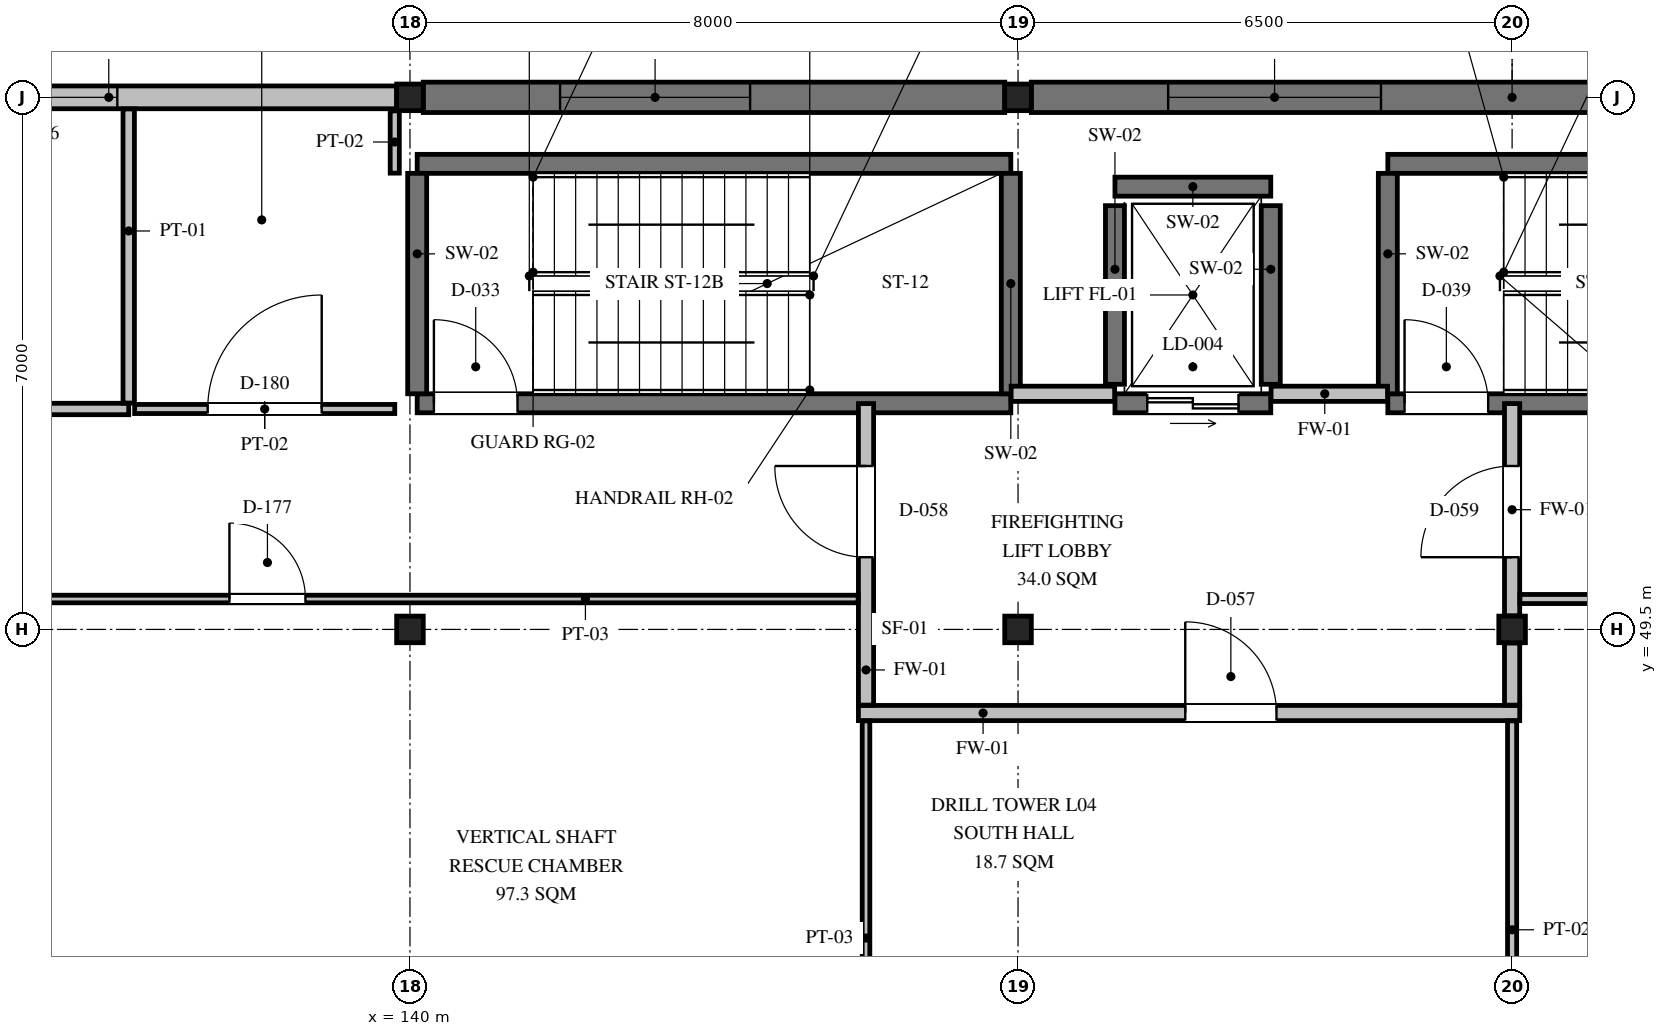
"""IFC4 building model, lengths in metres.
Left out: names, types, materials, properties, quantities, classifications, styles, units other than length and angle.
Written with IfcOpenShell. Run it as: python <this file> out.ifc"""

import sys

from ifc_helpers import new_model, si_unit, direction, frame, frame_2d, origin, origin_2d, place, context, subcontext, project, spatial, rectangle, i_section, extrude, element, fill, save


model = new_model("IFC4")
c1 = context("Model", 3, precision=1e-05, world=origin(), true_north=direction((0.0, 1.0)))
c2 = subcontext(c1, "Body", "Model", "MODEL_VIEW")
j1 = project(units=[si_unit("LENGTHUNIT", "METRE"), si_unit("PLANEANGLEUNIT", "RADIAN")], contexts=[c1])
p1 = place(None, origin())
s1 = spatial("IfcSite", under=j1, at=p1, CompositionType="ELEMENT")
p2 = place(p1, origin())
s2 = spatial("IfcBuilding", under=s1, at=p2, CompositionType="ELEMENT")
p3 = place(p2, frame((0.0, 0.0, 14.25)))
s3 = spatial("IfcBuildingStorey", under=s2, at=p3, CompositionType="ELEMENT", Elevation=14.25)
for number, where, z_axis, x_axis in (
    (1, (140.0, 49.5, 0.0), (0.0, 0.0, 1.0), (1.0, 0.0, 0.0)),
    (2, (140.0, 56.5, 0.0), (0.0, 0.0, 1.0), (1.0, 0.0, 0.0)),
    (3, (148.0, 49.5, 0.0), (0.0, 0.0, 1.0), (1.0, 0.0, 0.0)),
    (4, (148.0, 56.5, 0.0), (0.0, 0.0, 1.0), (1.0, 0.0, 0.0)),
    (5, (154.5, 49.5, 0.0), (0.0, 0.0, 1.0), (1.0, 0.0, 0.0)),
):
    element("IfcColumn", number, at=place(p3, frame(where, z_axis=z_axis, x_axis=x_axis)), inside=s3, PredefinedType="COLUMN", context=c2, shape_type="SweptSolid", body=[
        extrude(i_section(OverallWidth=0.35, OverallDepth=0.35, WebThickness=0.012, FlangeThickness=0.019, FilletRadius=0.02, at=origin_2d()), origin(), (0.0, 0.0, 1.0), 4.2),
    ])
p4 = place(p3, frame((132.25, 56.5, 0.0), z_axis=(0.0, 0.0, 1.0), x_axis=(1.0, 0.0, 0.0)))
e6 = element("IfcWall", 6, at=p4, inside=s3, PredefinedType="SOLIDWALL", context=c2, shape_type="SweptSolid", body=[
    extrude(rectangle(XDim=7.575, YDim=0.3, at=frame_2d((3.788, 0.0))), origin(), (0.0, 0.0, 1.0), 3.444),
])
p5 = place(p4, frame((1.8, 0.0, 0.9)))
e7 = element("IfcOpeningElement", 7, at=p5, cuts=e6, PredefinedType="OPENING", context=c2, shape_type="SweptSolid", body=[
    extrude(rectangle(XDim=2.1, YDim=2.1, at=frame_2d((1.05, 1.05))), frame((0.0, 0.16, 0.0), z_axis=(0.0, -1.0, 0.0), x_axis=(1.0, 0.0, 0.0)), (0.0, 0.0, 1.0), 0.32),
])
p6 = place(p3, frame((140.175, 56.5, 0.0), z_axis=(0.0, 0.0, 1.0), x_axis=(1.0, 0.0, 0.0)))
e8 = element("IfcWall", 8, at=p6, inside=s3, PredefinedType="SHEAR", context=c2, shape_type="SweptSolid", body=[
    extrude(rectangle(XDim=7.65, YDim=0.4, at=frame_2d((3.825, 0.0))), origin(), (0.0, 0.0, 1.0), 4.0),
])
p7 = place(p6, frame((1.8, 0.0, 0.9)))
e9 = element("IfcOpeningElement", 9, at=p7, cuts=e8, PredefinedType="OPENING", context=c2, shape_type="SweptSolid", body=[
    extrude(rectangle(XDim=2.5, YDim=2.1, at=frame_2d((1.25, 1.05))), frame((0.0, 0.21, 0.0), z_axis=(0.0, -1.0, 0.0), x_axis=(1.0, 0.0, 0.0)), (0.0, 0.0, 1.0), 0.42),
])
p8 = place(p3, frame((148.175, 56.5, 0.0), z_axis=(0.0, 0.0, 1.0), x_axis=(1.0, 0.0, 0.0)))
e10 = element("IfcWall", 10, at=p8, inside=s3, PredefinedType="SHEAR", context=c2, shape_type="SweptSolid", body=[
    extrude(rectangle(XDim=12.65, YDim=0.4, at=frame_2d((6.325, 0.0))), origin(), (0.0, 0.0, 1.0), 4.0),
])
p9 = place(p8, frame((1.8, 0.0, 0.9)))
e11 = element("IfcOpeningElement", 11, at=p9, cuts=e10, PredefinedType="OPENING", context=c2, shape_type="SweptSolid", body=[
    extrude(rectangle(XDim=2.8, YDim=1.2, at=frame_2d((1.4, 0.6))), frame((0.0, 0.21, 0.0), z_axis=(0.0, -1.0, 0.0), x_axis=(1.0, 0.0, 0.0)), (0.0, 0.0, 1.0), 0.42),
])
p10 = place(p3, frame((140.095, 52.475, 0.0), z_axis=(0.0, 0.0, 1.0), x_axis=(1.0, 0.0, 0.0)))
e12 = element("IfcWall", 12, at=p10, inside=s3, PredefinedType="SHEAR", context=c2, shape_type="SweptSolid", body=[
    extrude(rectangle(XDim=7.81, YDim=0.25, at=frame_2d((3.905, 0.0))), origin(), (0.0, 0.0, 1.0), 4.0),
])
p11 = place(p10, frame((0.22, 0.0, 0.0)))
e13 = element("IfcOpeningElement", 13, at=p11, cuts=e12, PredefinedType="OPENING", context=c2, shape_type="SweptSolid", body=[
    extrude(rectangle(XDim=1.1, YDim=2.15, at=frame_2d((0.55, 1.075))), frame((0.0, 0.135, 0.0), z_axis=(0.0, -1.0, 0.0), x_axis=(1.0, 0.0, 0.0)), (0.0, 0.0, 1.0), 0.27),
])
p12 = place(p3, frame((140.095, 55.625, 0.0), z_axis=(0.0, 0.0, 1.0), x_axis=(1.0, 0.0, 0.0)))
e14 = element("IfcWall", 14, at=p12, inside=s3, PredefinedType="SHEAR", context=c2, shape_type="SweptSolid", body=[
    extrude(rectangle(XDim=7.81, YDim=0.25, at=frame_2d((3.905, 0.0))), origin(), (0.0, 0.0, 1.0), 4.0),
])
for number, where, z_axis, x_axis in (
    (15, (140.095, 52.6, 0.0), (0.0, 0.0, 1.0), (0.0, 1.0, 0.0)),
    (16, (147.905, 52.6, 0.0), (0.0, 0.0, 1.0), (0.0, 1.0, 0.0)),
):
    element("IfcWall", number, at=place(p3, frame(where, z_axis=z_axis, x_axis=x_axis)), inside=s3, PredefinedType="SHEAR", context=c2, shape_type="SweptSolid", body=[
        extrude(rectangle(XDim=2.9, YDim=0.25, at=frame_2d((1.45, 0.0))), origin(), (0.0, 0.0, 1.0), 4.0),
    ])
p13 = place(p3, frame((152.865, 52.475, 0.0), z_axis=(0.0, 0.0, 1.0), x_axis=(1.0, 0.0, 0.0)))
e17 = element("IfcWall", 17, at=p13, inside=s3, PredefinedType="SHEAR", context=c2, shape_type="SweptSolid", body=[
    extrude(rectangle(XDim=7.935, YDim=0.25, at=frame_2d((3.968, 0.0))), origin(), (0.0, 0.0, 1.0), 4.0),
])
p14 = place(p13, frame((0.22, 0.0, 0.0)))
e18 = element("IfcOpeningElement", 18, at=p14, cuts=e17, PredefinedType="OPENING", context=c2, shape_type="SweptSolid", body=[
    extrude(rectangle(XDim=1.1, YDim=2.15, at=frame_2d((0.55, 1.075))), frame((0.0, 0.135, 0.0), z_axis=(0.0, -1.0, 0.0), x_axis=(1.0, 0.0, 0.0)), (0.0, 0.0, 1.0), 0.27),
])
p15 = place(p3, frame((152.865, 55.625, 0.0), z_axis=(0.0, 0.0, 1.0), x_axis=(1.0, 0.0, 0.0)))
e19 = element("IfcWall", 19, at=p15, inside=s3, PredefinedType="SHEAR", context=c2, shape_type="SweptSolid", body=[
    extrude(rectangle(XDim=7.935, YDim=0.25, at=frame_2d((3.968, 0.0))), origin(), (0.0, 0.0, 1.0), 4.0),
])
p16 = place(p3, frame((152.865, 52.6, 0.0), z_axis=(0.0, 0.0, 1.0), x_axis=(0.0, 1.0, 0.0)))
e20 = element("IfcWall", 20, at=p16, inside=s3, PredefinedType="SHEAR", context=c2, shape_type="SweptSolid", body=[
    extrude(rectangle(XDim=2.9, YDim=0.25, at=frame_2d((1.45, 0.0))), origin(), (0.0, 0.0, 1.0), 4.0),
])
p17 = place(p3, frame((149.275, 52.475, 0.0), z_axis=(0.0, 0.0, 1.0), x_axis=(1.0, 0.0, 0.0)))
e21 = element("IfcWall", 21, at=p17, inside=s3, PredefinedType="SHEAR", context=c2, shape_type="SweptSolid", body=[
    extrude(rectangle(XDim=2.05, YDim=0.25, at=frame_2d((1.025, 0.0))), origin(), (0.0, 0.0, 1.0), 4.0),
])
p18 = place(p17, frame((0.425, 0.0, 0.0)))
e22 = element("IfcOpeningElement", 22, at=p18, cuts=e21, PredefinedType="OPENING", context=c2, shape_type="SweptSolid", body=[
    extrude(rectangle(XDim=1.2, YDim=2.15, at=frame_2d((0.6, 1.075))), frame((0.0, 0.135, 0.0), z_axis=(0.0, -1.0, 0.0), x_axis=(1.0, 0.0, 0.0)), (0.0, 0.0, 1.0), 0.27),
])
p19 = place(p3, frame((149.275, 55.325, 0.0), z_axis=(0.0, 0.0, 1.0), x_axis=(1.0, 0.0, 0.0)))
e23 = element("IfcWall", 23, at=p19, inside=s3, PredefinedType="SHEAR", context=c2, shape_type="SweptSolid", body=[
    extrude(rectangle(XDim=2.05, YDim=0.25, at=frame_2d((1.025, 0.0))), origin(), (0.0, 0.0, 1.0), 4.0),
])
for number, where, z_axis, x_axis in (
    (24, (149.275, 52.725, 0.0), (0.0, 0.0, 1.0), (0.0, 1.0, 0.0)),
    (25, (151.325, 52.725, 0.0), (0.0, 0.0, 1.0), (0.0, 1.0, 0.0)),
):
    element("IfcWall", number, at=place(p3, frame(where, z_axis=z_axis, x_axis=x_axis)), inside=s3, PredefinedType="SHEAR", context=c2, shape_type="SweptSolid", body=[
        extrude(rectangle(XDim=2.35, YDim=0.25, at=frame_2d((1.175, 0.0))), origin(), (0.0, 0.0, 1.0), 4.0),
    ])
p20 = place(p3, frame((147.909, 52.6, 0.0), z_axis=(0.0, 0.0, 1.0), x_axis=(1.0, 0.0, 0.0)))
e26 = element("IfcWall", 26, at=p20, inside=s3, PredefinedType="PARTITIONING", context=c2, shape_type="SweptSolid", body=[
    extrude(rectangle(XDim=1.362, YDim=0.2, at=frame_2d((0.681, 0.0))), origin(), (0.0, 0.0, 1.0), 4.0),
])
p21 = place(p3, frame((151.329, 52.6, 0.0), z_axis=(0.0, 0.0, 1.0), x_axis=(1.0, 0.0, 0.0)))
e27 = element("IfcWall", 27, at=p21, inside=s3, PredefinedType="PARTITIONING", context=c2, shape_type="SweptSolid", body=[
    extrude(rectangle(XDim=1.532, YDim=0.2, at=frame_2d((0.766, 0.0))), origin(), (0.0, 0.0, 1.0), 4.0),
])
p22 = place(p3, frame((145.9, 48.4, 0.0), z_axis=(0.0, 0.0, 1.0), x_axis=(1.0, 0.0, 0.0)))
e28 = element("IfcWall", 28, at=p22, inside=s3, PredefinedType="PARTITIONING", context=c2, shape_type="SweptSolid", body=[
    extrude(rectangle(XDim=8.7, YDim=0.2, at=frame_2d((4.35, 0.0))), origin(), (0.0, 0.0, 1.0), 4.0),
])
p23 = place(p22, frame((4.3, 0.0, 0.0)))
e29 = element("IfcOpeningElement", 29, at=p23, cuts=e28, PredefinedType="OPENING", context=c2, shape_type="SweptSolid", body=[
    extrude(rectangle(XDim=1.2, YDim=2.15, at=frame_2d((0.6, 1.075))), frame((0.0, 0.11, 0.0), z_axis=(0.0, -1.0, 0.0), x_axis=(1.0, 0.0, 0.0)), (0.0, 0.0, 1.0), 0.22),
])
p24 = place(p3, frame((146.0, 48.504, 0.0), z_axis=(0.0, 0.0, 1.0), x_axis=(0.0, 1.0, 0.0)))
e30 = element("IfcWall", 30, at=p24, inside=s3, PredefinedType="PARTITIONING", context=c2, shape_type="SweptSolid", body=[
    extrude(rectangle(XDim=3.967, YDim=0.2, at=frame_2d((1.983, 0.0))), origin(), (0.0, 0.0, 1.0), 4.0),
])
p25 = place(p24, frame((1.946, 0.0, 0.0)))
e31 = element("IfcOpeningElement", 31, at=p25, cuts=e30, PredefinedType="OPENING", context=c2, shape_type="SweptSolid", body=[
    extrude(rectangle(XDim=1.2, YDim=2.15, at=frame_2d((0.6, 1.075))), frame((0.0, 0.11, 0.0), z_axis=(0.0, -1.0, 0.0), x_axis=(1.0, 0.0, 0.0)), (0.0, 0.0, 1.0), 0.22),
])
p26 = place(p3, frame((154.5, 48.504, 0.0), z_axis=(0.0, 0.0, 1.0), x_axis=(0.0, 1.0, 0.0)))
e32 = element("IfcWall", 32, at=p26, inside=s3, PredefinedType="PARTITIONING", context=c2, shape_type="SweptSolid", body=[
    extrude(rectangle(XDim=0.817, YDim=0.2, at=frame_2d((0.409, 0.0))), origin(), (0.0, 0.0, 1.0), 3.494),
])
p27 = place(p3, frame((154.5, 49.679, 0.0), z_axis=(0.0, 0.0, 1.0), x_axis=(0.0, 1.0, 0.0)))
e33 = element("IfcWall", 33, at=p27, inside=s3, PredefinedType="PARTITIONING", context=c2, shape_type="SweptSolid", body=[
    extrude(rectangle(XDim=2.792, YDim=0.2, at=frame_2d((1.396, 0.0))), origin(), (0.0, 0.0, 1.0), 4.0),
])
p28 = place(p27, frame((0.771, 0.0, 0.0)))
e34 = element("IfcOpeningElement", 34, at=p28, cuts=e33, PredefinedType="OPENING", context=c2, shape_type="SweptSolid", body=[
    extrude(rectangle(XDim=1.2, YDim=2.15, at=frame_2d((0.6, 1.075))), frame((0.0, 0.11, 0.0), z_axis=(0.0, -1.0, 0.0), x_axis=(1.0, 0.0, 0.0)), (0.0, 0.0, 1.0), 0.22),
])
p29 = place(p3, frame((132.153, 49.9, 0.0), z_axis=(0.0, 0.0, 1.0), x_axis=(1.0, 0.0, 0.0)))
e35 = element("IfcWall", 35, at=p29, inside=s3, PredefinedType="PARTITIONING", context=c2, shape_type="SweptSolid", body=[
    extrude(rectangle(XDim=13.744, YDim=0.1, at=frame_2d((6.872, 0.0))), origin(), (0.0, 0.0, 1.0), 4.0),
])
p30 = place(p29, frame((5.472, 0.0, 0.0)))
e36 = element("IfcOpeningElement", 36, at=p30, cuts=e35, PredefinedType="OPENING", context=c2, shape_type="SweptSolid", body=[
    extrude(rectangle(XDim=1.0, YDim=2.1, at=frame_2d((0.5, 1.05))), frame((0.0, 0.06, 0.0), z_axis=(0.0, -1.0, 0.0), x_axis=(1.0, 0.0, 0.0)), (0.0, 0.0, 1.0), 0.12),
])
p31 = place(p3, frame((146.0, 42.583, 0.0), z_axis=(0.0, 0.0, 1.0), x_axis=(0.0, 1.0, 0.0)))
e37 = element("IfcWall", 37, at=p31, inside=s3, PredefinedType="PARTITIONING", context=c2, shape_type="SweptSolid", body=[
    extrude(rectangle(XDim=5.714, YDim=0.1, at=frame_2d((2.857, 0.0))), origin(), (0.0, 0.0, 1.0), 4.0),
])
p32 = place(p3, frame((154.603, 49.9, 0.0), z_axis=(0.0, 0.0, 1.0), x_axis=(1.0, 0.0, 0.0)))
e38 = element("IfcWall", 38, at=p32, inside=s3, PredefinedType="PARTITIONING", context=c2, shape_type="SweptSolid", body=[
    extrude(rectangle(XDim=6.194, YDim=0.12, at=frame_2d((3.097, 0.0))), origin(), (0.0, 0.0, 1.0), 4.0),
])
p33 = place(p32, frame((2.522, 0.0, 0.0)))
e39 = element("IfcOpeningElement", 39, at=p33, cuts=e38, PredefinedType="OPENING", context=c2, shape_type="SweptSolid", body=[
    extrude(rectangle(XDim=1.15, YDim=2.1, at=frame_2d((0.575, 1.05))), frame((0.0, 0.07, 0.0), z_axis=(0.0, -1.0, 0.0), x_axis=(1.0, 0.0, 0.0)), (0.0, 0.0, 1.0), 0.14),
])
p34 = place(p3, frame((154.5, 42.8, 0.0), z_axis=(0.0, 0.0, 1.0), x_axis=(0.0, 1.0, 0.0)))
e40 = element("IfcWall", 40, at=p34, inside=s3, PredefinedType="PARTITIONING", context=c2, shape_type="SweptSolid", body=[
    extrude(rectangle(XDim=5.497, YDim=0.12, at=frame_2d((2.749, 0.0))), origin(), (0.0, 0.0, 1.0), 3.494),
])
p35 = place(p3, frame((132.153, 52.4, 0.0), z_axis=(0.0, 0.0, 1.0), x_axis=(1.0, 0.0, 0.0)))
e41 = element("IfcWall", 41, at=p35, inside=s3, PredefinedType="PARTITIONING", context=c2, shape_type="SweptSolid", body=[
    extrude(rectangle(XDim=4.147, YDim=0.15, at=frame_2d((2.073, 0.0))), origin(), (0.0, 0.0, 1.0), 4.0),
])
p36 = place(p35, frame((1.614, 0.0, 0.0)))
e42 = element("IfcOpeningElement", 42, at=p36, cuts=e41, PredefinedType="OPENING", context=c2, shape_type="SweptSolid", body=[
    extrude(rectangle(XDim=0.92, YDim=2.1, at=frame_2d((0.46, 1.05))), frame((0.0, 0.085, 0.0), z_axis=(0.0, -1.0, 0.0), x_axis=(1.0, 0.0, 0.0)), (0.0, 0.0, 1.0), 0.17),
])
p37 = place(p3, frame((136.3, 52.478, 0.0), z_axis=(0.0, 0.0, 1.0), x_axis=(0.0, 1.0, 0.0)))
e43 = element("IfcWall", 43, at=p37, inside=s3, PredefinedType="PARTITIONING", context=c2, shape_type="SweptSolid", body=[
    extrude(rectangle(XDim=3.869, YDim=0.15, at=frame_2d((1.935, 0.0))), origin(), (0.0, 0.0, 1.0), 4.0),
])
p38 = place(p3, frame((136.378, 52.4, 0.0), z_axis=(0.0, 0.0, 1.0), x_axis=(1.0, 0.0, 0.0)))
e44 = element("IfcWall", 44, at=p38, inside=s3, PredefinedType="PARTITIONING", context=c2, shape_type="SweptSolid", body=[
    extrude(rectangle(XDim=3.422, YDim=0.12, at=frame_2d((1.711, 0.0))), origin(), (0.0, 0.0, 1.0), 4.0),
])
p39 = place(p38, frame((0.961, 0.0, 0.0)))
e45 = element("IfcOpeningElement", 45, at=p39, cuts=e44, PredefinedType="OPENING", context=c2, shape_type="SweptSolid", body=[
    extrude(rectangle(XDim=1.5, YDim=2.25, at=frame_2d((0.75, 1.125))), frame((0.0, 0.07, 0.0), z_axis=(0.0, -1.0, 0.0), x_axis=(1.0, 0.0, 0.0)), (0.0, 0.0, 1.0), 0.14),
])
p40 = place(p3, frame((139.8, 55.503, 0.0), z_axis=(0.0, 0.0, 1.0), x_axis=(0.0, 1.0, 0.0)))
e46 = element("IfcWall", 46, at=p40, inside=s3, PredefinedType="PARTITIONING", context=c2, shape_type="SweptSolid", body=[
    extrude(rectangle(XDim=0.819, YDim=0.12, at=frame_2d((0.41, 0.0))), origin(), (0.0, 0.0, 1.0), 4.0),
])
p41 = place(p5, origin())
e47 = element("IfcWindow", 47, at=p41, inside=s3, PartitioningType="SINGLE_PANEL", PredefinedType="WINDOW", context=c2, shape_type="SweptSolid", body=[
    extrude(rectangle(XDim=2.1, YDim=2.1, at=frame_2d((1.05, 1.05))), frame((0.0, 0.03, 0.0), z_axis=(0.0, -1.0, 0.0), x_axis=(1.0, 0.0, 0.0)), (0.0, 0.0, 1.0), 0.06),
])
fill(e7, e47)
p42 = place(p7, origin())
e48 = element("IfcWindow", 48, at=p42, inside=s3, PartitioningType="SINGLE_PANEL", PredefinedType="WINDOW", context=c2, shape_type="SweptSolid", body=[
    extrude(rectangle(XDim=2.5, YDim=2.1, at=frame_2d((1.25, 1.05))), frame((0.0, 0.03, 0.0), z_axis=(0.0, -1.0, 0.0), x_axis=(1.0, 0.0, 0.0)), (0.0, 0.0, 1.0), 0.06),
])
fill(e9, e48)
p43 = place(p9, origin())
e49 = element("IfcWindow", 49, at=p43, inside=s3, PartitioningType="SINGLE_PANEL", PredefinedType="WINDOW", context=c2, shape_type="SweptSolid", body=[
    extrude(rectangle(XDim=2.8, YDim=1.2, at=frame_2d((1.4, 0.6))), frame((0.0, 0.03, 0.0), z_axis=(0.0, -1.0, 0.0), x_axis=(1.0, 0.0, 0.0)), (0.0, 0.0, 1.0), 0.06),
])
fill(e11, e49)
p44 = place(p11, frame((1.1, 0.0, 0.0), z_axis=(0.0, 0.0, 1.0), x_axis=(-1.0, 0.0, 0.0)))
e50 = element("IfcDoor", 50, at=p44, inside=s3, OperationType="SINGLE_SWING_LEFT", PredefinedType="DOOR", context=c2, shape_type="SweptSolid", body=[
    extrude(rectangle(XDim=1.1, YDim=2.15, at=frame_2d((0.55, 1.075))), frame((0.0, 0.025, 0.0), z_axis=(0.0, -1.0, 0.0), x_axis=(1.0, 0.0, 0.0)), (0.0, 0.0, 1.0), 0.05),
])
fill(e13, e50)
p45 = place(p14, frame((1.1, 0.0, 0.0), z_axis=(0.0, 0.0, 1.0), x_axis=(-1.0, 0.0, 0.0)))
e51 = element("IfcDoor", 51, at=p45, inside=s3, OperationType="SINGLE_SWING_LEFT", PredefinedType="DOOR", context=c2, shape_type="SweptSolid", body=[
    extrude(rectangle(XDim=1.1, YDim=2.15, at=frame_2d((0.55, 1.075))), frame((0.0, 0.025, 0.0), z_axis=(0.0, -1.0, 0.0), x_axis=(1.0, 0.0, 0.0)), (0.0, 0.0, 1.0), 0.05),
])
fill(e18, e51)
p46 = place(p18, origin())
e52 = element("IfcDoor", 52, at=p46, inside=s3, OperationType="DOUBLE_DOOR_SLIDING", PredefinedType="DOOR", context=c2, shape_type="SweptSolid", body=[
    extrude(rectangle(XDim=1.2, YDim=2.15, at=frame_2d((0.6, 1.075))), frame((0.0, 0.025, 0.0), z_axis=(0.0, -1.0, 0.0), x_axis=(1.0, 0.0, 0.0)), (0.0, 0.0, 1.0), 0.05),
])
fill(e22, e52)
p47 = place(p23, origin())
e53 = element("IfcDoor", 53, at=p47, inside=s3, OperationType="SINGLE_SWING_LEFT", PredefinedType="DOOR", context=c2, shape_type="SweptSolid", body=[
    extrude(rectangle(XDim=1.2, YDim=2.15, at=frame_2d((0.6, 1.075))), frame((0.0, 0.025, 0.0), z_axis=(0.0, -1.0, 0.0), x_axis=(1.0, 0.0, 0.0)), (0.0, 0.0, 1.0), 0.05),
])
fill(e29, e53)
p48 = place(p25, origin())
e54 = element("IfcDoor", 54, at=p48, inside=s3, OperationType="SINGLE_SWING_RIGHT", PredefinedType="DOOR", context=c2, shape_type="SweptSolid", body=[
    extrude(rectangle(XDim=1.2, YDim=2.15, at=frame_2d((0.6, 1.075))), frame((0.0, 0.025, 0.0), z_axis=(0.0, -1.0, 0.0), x_axis=(1.0, 0.0, 0.0)), (0.0, 0.0, 1.0), 0.05),
])
fill(e31, e54)
p49 = place(p28, origin())
e55 = element("IfcDoor", 55, at=p49, inside=s3, OperationType="SINGLE_SWING_LEFT", PredefinedType="DOOR", context=c2, shape_type="SweptSolid", body=[
    extrude(rectangle(XDim=1.2, YDim=2.15, at=frame_2d((0.6, 1.075))), frame((0.0, 0.025, 0.0), z_axis=(0.0, -1.0, 0.0), x_axis=(1.0, 0.0, 0.0)), (0.0, 0.0, 1.0), 0.05),
])
fill(e34, e55)
p50 = place(p30, origin())
e56 = element("IfcDoor", 56, at=p50, inside=s3, OperationType="SINGLE_SWING_LEFT", PredefinedType="DOOR", context=c2, shape_type="SweptSolid", body=[
    extrude(rectangle(XDim=1.0, YDim=2.1, at=frame_2d((0.5, 1.05))), frame((0.0, 0.025, 0.0), z_axis=(0.0, -1.0, 0.0), x_axis=(1.0, 0.0, 0.0)), (0.0, 0.0, 1.0), 0.05),
])
fill(e36, e56)
p51 = place(p39, origin())
e57 = element("IfcDoor", 57, at=p51, inside=s3, OperationType="SINGLE_SWING_RIGHT", PredefinedType="DOOR", context=c2, shape_type="SweptSolid", body=[
    extrude(rectangle(XDim=1.5, YDim=2.25, at=frame_2d((0.75, 1.125))), frame((0.0, 0.025, 0.0), z_axis=(0.0, -1.0, 0.0), x_axis=(1.0, 0.0, 0.0)), (0.0, 0.0, 1.0), 0.05),
])
fill(e45, e57)
save(model, sys.argv[1])
